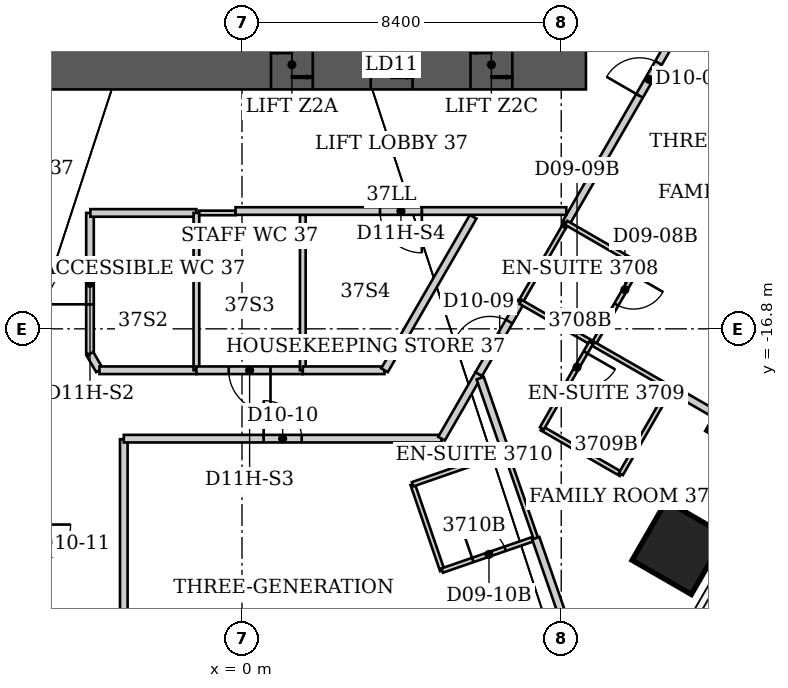
"""IFC4 building model, lengths in metres.
Left out: names, types, materials, properties, quantities, classifications, styles, units other than length and angle.
Written with IfcOpenShell. Run it as: python <this file> out.ifc"""

import sys

from ifc_helpers import new_model, si_unit, direction, frame, frame_2d, origin, origin_2d, place, context, subcontext, project, spatial, rectangle, extrude, element, fill, save


model = new_model("IFC4")
c1 = context("Model", 3, precision=1e-05, world=origin(), true_north=direction((0.0, 1.0)))
c2 = subcontext(c1, "Body", "Model", "MODEL_VIEW")
j1 = project(units=[si_unit("LENGTHUNIT", "METRE"), si_unit("PLANEANGLEUNIT", "RADIAN")], contexts=[c1])
p1 = place(None, origin())
s1 = spatial("IfcSite", under=j1, at=p1, CompositionType="ELEMENT")
p2 = place(p1, origin())
s2 = spatial("IfcBuilding", under=s1, at=p2, CompositionType="ELEMENT")
p3 = place(p2, frame((0.0, 0.0, 150.0)))
s3 = spatial("IfcBuildingStorey", under=s2, at=p3, CompositionType="ELEMENT", Elevation=150.0)
p4 = place(p3, frame((13.464, -19.147, -0.062), z_axis=(-0.029984502764, 0.04260955656, 0.998641755227), x_axis=(0.865747631398, -0.498245094486, 0.047253196188)))
e1 = element("IfcColumn", 1, at=p4, inside=s3, PredefinedType="COLUMN", context=c2, shape_type="SweptSolid", body=[
    extrude(rectangle(XDim=1.8, YDim=1.8, at=origin_2d()), origin(), (0.0, 0.0, 1.0), 3.868),
])
p5 = place(p3, frame((11.494, -22.559, -0.07), z_axis=(-0.025571235621, 0.050197721157, 0.998411889302), x_axis=(0.865745559121, -0.498251437924, 0.047224267791)))
e2 = element("IfcColumn", 2, at=p5, inside=s3, PredefinedType="COLUMN", context=c2, shape_type="SweptSolid", body=[
    extrude(rectangle(XDim=1.8, YDim=1.8, at=origin_2d()), origin(), (0.0, 0.0, 1.0), 3.876),
])
p6 = place(p3, frame((-9.05, -9.85, 0.0), z_axis=(0.0, 0.0, 1.0), x_axis=(1.0, 0.0, 0.0)))
e3 = element("IfcWall", 3, at=p6, inside=s3, PredefinedType="SHEAR", context=c2, shape_type="SweptSolid", body=[
    extrude(rectangle(XDim=18.1, YDim=1.3, at=frame_2d((9.05, 0.0))), origin(), (0.0, 0.0, 1.0), 3.8),
])
p7 = place(p6, frame((1.938, 0.0, 0.0)))
e4 = element("IfcOpeningElement", 4, at=p7, cuts=e3, PredefinedType="OPENING", context=c2, shape_type="SweptSolid", body=[
    extrude(rectangle(XDim=1.1, YDim=2.2, at=frame_2d((0.55, 1.1))), frame((0.0, 0.65, 0.0), z_axis=(0.0, -1.0, 0.0), x_axis=(1.0, 0.0, 0.0)), (0.0, 0.0, 1.0), 1.3),
])
p8 = place(p6, frame((9.812, 0.0, 0.0)))
e5 = element("IfcOpeningElement", 5, at=p8, cuts=e3, PredefinedType="OPENING", context=c2, shape_type="SweptSolid", body=[
    extrude(rectangle(XDim=1.1, YDim=2.1, at=frame_2d((0.55, 1.05))), frame((0.0, 0.65, 0.0), z_axis=(0.0, -1.0, 0.0), x_axis=(1.0, 0.0, 0.0)), (0.0, 0.0, 1.0), 1.3),
])
p9 = place(p6, frame((12.438, 0.0, 0.0)))
e6 = element("IfcOpeningElement", 6, at=p9, cuts=e3, PredefinedType="OPENING", context=c2, shape_type="SweptSolid", body=[
    extrude(rectangle(XDim=1.1, YDim=2.1, at=frame_2d((0.55, 1.05))), frame((0.0, 0.65, 0.0), z_axis=(0.0, -1.0, 0.0), x_axis=(1.0, 0.0, 0.0)), (0.0, 0.0, 1.0), 1.3),
])
p10 = place(p6, frame((15.062, 0.0, 0.0)))
e7 = element("IfcOpeningElement", 7, at=p10, cuts=e3, PredefinedType="OPENING", context=c2, shape_type="SweptSolid", body=[
    extrude(rectangle(XDim=1.1, YDim=2.1, at=frame_2d((0.55, 1.05))), frame((0.0, 0.65, 0.0), z_axis=(0.0, -1.0, 0.0), x_axis=(1.0, 0.0, 0.0)), (0.0, 0.0, 1.0), 1.3),
])
p11 = place(p3, frame((-4.0, -17.46, 0.0), z_axis=(0.0, 0.0, 1.0), x_axis=(0.0, 1.0, 0.0)))
e8 = element("IfcWall", 8, at=p11, inside=s3, PredefinedType="PARTITIONING", context=c2, shape_type="SweptSolid", body=[
    extrude(rectangle(XDim=3.71, YDim=0.2, at=frame_2d((1.855, 0.0))), origin(), (0.0, 0.0, 1.0), 2.878),
])
p12 = place(p11, frame((1.305, 0.0, 0.0)))
e9 = element("IfcOpeningElement", 9, at=p12, cuts=e8, PredefinedType="OPENING", context=c2, shape_type="SweptSolid", body=[
    extrude(rectangle(XDim=1.1, YDim=2.2, at=frame_2d((0.55, 1.1))), frame((0.0, 0.1, 0.0), z_axis=(0.0, -1.0, 0.0), x_axis=(1.0, 0.0, 0.0)), (0.0, 0.0, 1.0), 0.2),
])
p13 = place(p3, frame((-3.99, -13.75, 0.0), z_axis=(0.0, 0.0, 1.0), x_axis=(1.0, 0.0, 0.0)))
e10 = element("IfcWall", 10, at=p13, inside=s3, PredefinedType="PARTITIONING", context=c2, shape_type="SweptSolid", body=[
    extrude(rectangle(XDim=2.79, YDim=0.2, at=frame_2d((1.395, 0.0))), origin(), (0.0, 0.0, 1.0), 3.64),
])
p14 = place(p3, frame((-3.75, -17.89, 0.0), z_axis=(0.0, 0.0, 1.0), x_axis=(-0.502680181512, 0.864472460588, 0.0)))
e11 = element("IfcWall", 11, at=p14, inside=s3, PredefinedType="PARTITIONING", context=c2, shape_type="SweptSolid", body=[
    extrude(rectangle(XDim=0.497, YDim=0.2, at=frame_2d((0.249, 0.0))), origin(), (0.0, 0.0, 1.0), 3.64),
])
p15 = place(p3, frame((-3.11, -25.65, 0.0), z_axis=(0.0, 0.0, 1.0), x_axis=(0.0, 1.0, 0.0)))
e12 = element("IfcWall", 12, at=p15, inside=s3, PredefinedType="PARTITIONING", context=c2, shape_type="SweptSolid", body=[
    extrude(rectangle(XDim=5.945, YDim=0.2, at=frame_2d((2.972, 0.0))), origin(), (0.0, 0.0, 1.0), 3.64),
])
p16 = place(p3, frame((-3.11, -19.69, 0.0), z_axis=(0.0, 0.0, 1.0), x_axis=(1.0, 0.0, 0.0)))
e13 = element("IfcWall", 13, at=p16, inside=s3, PredefinedType="PARTITIONING", context=c2, shape_type="SweptSolid", body=[
    extrude(rectangle(XDim=8.36, YDim=0.2, at=frame_2d((4.18, 0.0))), origin(), (0.0, 0.0, 1.0), 3.64),
])
p17 = place(p16, frame((3.68, 0.0, 0.0)))
e14 = element("IfcOpeningElement", 14, at=p17, cuts=e13, PredefinedType="OPENING", context=c2, shape_type="SweptSolid", body=[
    extrude(rectangle(XDim=1.0, YDim=2.13, at=frame_2d((0.5, 1.065))), frame((0.0, 0.1, 0.0), z_axis=(0.0, -1.0, 0.0), x_axis=(1.0, 0.0, 0.0)), (0.0, 0.0, 1.0), 0.2),
])
p18 = place(p3, frame((-1.2, -17.89, 0.0), z_axis=(0.0, 0.0, 1.0), x_axis=(-1.0, 0.0, 0.0)))
e15 = element("IfcWall", 15, at=p18, inside=s3, PredefinedType="PARTITIONING", context=c2, shape_type="SweptSolid", body=[
    extrude(rectangle(XDim=2.55, YDim=0.2, at=frame_2d((1.275, 0.0))), origin(), (0.0, 0.0, 1.0), 3.64),
])
p19 = place(p3, frame((-1.2, -13.75, 0.0), z_axis=(0.0, 0.0, 1.0), x_axis=(0.0, -1.0, 0.0)))
e16 = element("IfcWall", 16, at=p19, inside=s3, PredefinedType="PARTITIONING", context=c2, shape_type="SweptSolid", body=[
    extrude(rectangle(XDim=4.14, YDim=0.15, at=frame_2d((2.07, 0.0))), origin(), (0.0, 0.0, 1.0), 3.64),
])
p20 = place(p3, frame((-1.125, -13.75, 0.0), z_axis=(0.0, 0.0, 1.0), x_axis=(1.0, 0.0, 0.0)))
e17 = element("IfcWall", 17, at=p20, inside=s3, PredefinedType="PARTITIONING", context=c2, shape_type="SweptSolid", body=[
    extrude(rectangle(XDim=0.955, YDim=0.12, at=frame_2d((0.478, 0.0))), origin(), (0.0, 0.0, 1.0), 3.64),
])
p21 = place(p3, frame((1.6, -17.89, 0.0), z_axis=(0.0, 0.0, 1.0), x_axis=(-1.0, 0.0, 0.0)))
e18 = element("IfcWall", 18, at=p21, inside=s3, PredefinedType="PARTITIONING", context=c2, shape_type="SweptSolid", body=[
    extrude(rectangle(XDim=2.8, YDim=0.2, at=frame_2d((1.4, 0.0))), origin(), (0.0, 0.0, 1.0), 3.64),
])
p22 = place(p21, frame((0.85, 0.0, 0.0)))
e19 = element("IfcOpeningElement", 19, at=p22, cuts=e18, PredefinedType="OPENING", context=c2, shape_type="SweptSolid", body=[
    extrude(rectangle(XDim=1.1, YDim=2.2, at=frame_2d((0.55, 1.1))), frame((0.0, 0.1, 0.0), z_axis=(0.0, -1.0, 0.0), x_axis=(1.0, 0.0, 0.0)), (0.0, 0.0, 1.0), 0.2),
])
p23 = place(p3, frame((1.6, -13.8, 0.0), z_axis=(0.0, 0.0, 1.0), x_axis=(0.0, -1.0, 0.0)))
e20 = element("IfcWall", 20, at=p23, inside=s3, PredefinedType="PARTITIONING", context=c2, shape_type="SweptSolid", body=[
    extrude(rectangle(XDim=4.09, YDim=0.15, at=frame_2d((2.045, 0.0))), origin(), (0.0, 0.0, 1.0), 3.64),
])
p24 = place(p3, frame((3.75, -17.89, 0.0), z_axis=(0.0, 0.0, 1.0), x_axis=(-1.0, 0.0, 0.0)))
e21 = element("IfcWall", 21, at=p24, inside=s3, PredefinedType="PARTITIONING", context=c2, shape_type="SweptSolid", body=[
    extrude(rectangle(XDim=2.15, YDim=0.2, at=frame_2d((1.075, 0.0))), origin(), (0.0, 0.0, 1.0), 3.64),
])
p25 = place(p3, frame((4.49, -20.89, 0.0), z_axis=(0.0, 0.0, 1.0), x_axis=(0.324971746724, -0.945723724896, 0.0)))
e22 = element("IfcWall", 22, at=p25, inside=s3, PredefinedType="PARTITIONING", context=c2, shape_type="SweptSolid", body=[
    extrude(rectangle(XDim=2.4, YDim=0.12, at=frame_2d((1.2, 0.0))), origin(), (0.0, 0.0, 1.0), 3.64),
])
p26 = place(p3, frame((5.25, -19.69, 0.0), z_axis=(0.0, 0.0, 1.0), x_axis=(0.499431599995, 0.866353321068, 0.0)))
e23 = element("IfcWall", 23, at=p26, inside=s3, PredefinedType="PARTITIONING", context=c2, shape_type="SweptSolid", body=[
    extrude(rectangle(XDim=1.962, YDim=0.2, at=frame_2d((0.981, 0.0))), origin(), (0.0, 0.0, 1.0), 3.64),
])
p27 = place(p3, frame((5.27, -23.16, 0.0), z_axis=(0.0, 0.0, 1.0), x_axis=(0.945184415197, 0.326537013627, 0.0)))
e24 = element("IfcWall", 24, at=p27, inside=s3, PredefinedType="PARTITIONING", context=c2, shape_type="SweptSolid", body=[
    extrude(rectangle(XDim=2.603, YDim=0.12, at=frame_2d((1.301, 0.0))), origin(), (0.0, 0.0, 1.0), 3.64),
])
p28 = place(p27, frame((0.85, 0.0, 0.0)))
e25 = element("IfcOpeningElement", 25, at=p28, cuts=e24, PredefinedType="OPENING", context=c2, shape_type="SweptSolid", body=[
    extrude(rectangle(XDim=0.9, YDim=2.03, at=frame_2d((0.45, 1.015))), frame((0.0, 0.06, 0.0), z_axis=(0.0, -1.0, 0.0), x_axis=(1.0, 0.0, 0.0)), (0.0, 0.0, 1.0), 0.12),
])
p29 = place(p3, frame((6.083, -13.85, 0.0), z_axis=(0.0, 0.0, 1.0), x_axis=(-0.499977643516, -0.866038310922, 0.0)))
e26 = element("IfcWall", 26, at=p29, inside=s3, PredefinedType="PARTITIONING", context=c2, shape_type="SweptSolid", body=[
    extrude(rectangle(XDim=4.665, YDim=0.2, at=frame_2d((2.333, 0.0))), origin(), (0.0, 0.0, 1.0), 3.64),
])
p30 = place(p3, frame((6.23, -17.99, 0.0), z_axis=(0.0, 0.0, 1.0), x_axis=(0.501088872721, 0.865395829453, 0.0)))
e27 = element("IfcWall", 27, at=p30, inside=s3, PredefinedType="PARTITIONING", context=c2, shape_type="SweptSolid", body=[
    extrude(rectangle(XDim=2.195, YDim=0.2, at=frame_2d((1.098, 0.0))), origin(), (0.0, 0.0, 1.0), 3.64),
])
p31 = place(p30, frame((0.598, 0.0, 0.0)))
e28 = element("IfcOpeningElement", 28, at=p31, cuts=e27, PredefinedType="OPENING", context=c2, shape_type="SweptSolid", body=[
    extrude(rectangle(XDim=1.0, YDim=2.13, at=frame_2d((0.5, 1.065))), frame((0.0, 0.1, 0.0), z_axis=(0.0, -1.0, 0.0), x_axis=(1.0, 0.0, 0.0)), (0.0, 0.0, 1.0), 0.2),
])
p32 = place(p3, frame((6.268, -18.099, 0.0), z_axis=(0.0, 0.0, 1.0), x_axis=(0.327257488288, -0.944935202202, 0.0)))
e29 = element("IfcWall", 29, at=p32, inside=s3, PredefinedType="PARTITIONING", context=c2, shape_type="SweptSolid", body=[
    extrude(rectangle(XDim=2.054, YDim=0.2, at=frame_2d((1.027, 0.0))), origin(), (0.0, 0.0, 1.0), 3.64),
])
p33 = place(p3, frame((6.94, -20.04, 0.0), z_axis=(0.0, 0.0, 1.0), x_axis=(-0.944772080486, -0.327728112822, 0.0)))
e30 = element("IfcWall", 30, at=p33, inside=s3, PredefinedType="PARTITIONING", context=c2, shape_type="SweptSolid", body=[
    extrude(rectangle(XDim=2.593, YDim=0.12, at=frame_2d((1.297, 0.0))), origin(), (0.0, 0.0, 1.0), 3.64),
])
p34 = place(p3, frame((6.94, -20.04, 0.0), z_axis=(0.0, 0.0, 1.0), x_axis=(0.328693963496, -0.944436487203, 0.0)))
e31 = element("IfcWall", 31, at=p34, inside=s3, PredefinedType="PARTITIONING", context=c2, shape_type="SweptSolid", body=[
    extrude(rectangle(XDim=2.404, YDim=0.12, at=frame_2d((1.202, 0.0))), origin(), (0.0, 0.0, 1.0), 3.64),
])
p35 = place(p3, frame((7.33, -16.09, 0.0), z_axis=(0.0, 0.0, 1.0), x_axis=(0.500786797394, 0.865570669302, 0.0)))
e32 = element("IfcWall", 32, at=p35, inside=s3, PredefinedType="PARTITIONING", context=c2, shape_type="SweptSolid", body=[
    extrude(rectangle(XDim=2.276, YDim=0.12, at=frame_2d((1.138, 0.0))), origin(), (0.0, 0.0, 1.0), 3.64),
])
p36 = place(p3, frame((7.33, -16.09, 0.0), z_axis=(0.0, 0.0, 1.0), x_axis=(0.866825160608, -0.498612214989, 0.0)))
e33 = element("IfcWall", 33, at=p36, inside=s3, PredefinedType="PARTITIONING", context=c2, shape_type="SweptSolid", body=[
    extrude(rectangle(XDim=2.146, YDim=0.12, at=frame_2d((1.073, 0.0))), origin(), (0.0, 0.0, 1.0), 3.64),
])
p37 = place(p3, frame((7.73, -22.31, 0.0), z_axis=(0.0, 0.0, 1.0), x_axis=(0.327284111977, -0.944925981253, 0.0)))
e34 = element("IfcWall", 34, at=p37, inside=s3, PredefinedType="PARTITIONING", context=c2, shape_type="SweptSolid", body=[
    extrude(rectangle(XDim=5.653, YDim=0.2, at=frame_2d((2.826, 0.0))), origin(), (0.0, 0.0, 1.0), 3.64),
])
p38 = place(p3, frame((7.89, -19.42, 0.0), z_axis=(0.0, 0.0, 1.0), x_axis=(0.866202511239, -0.499693115345, 0.0)))
e35 = element("IfcWall", 35, at=p38, inside=s3, PredefinedType="PARTITIONING", context=c2, shape_type="SweptSolid", body=[
    extrude(rectangle(XDim=2.401, YDim=0.12, at=frame_2d((1.201, 0.0))), origin(), (0.0, 0.0, 1.0), 3.64),
])
p39 = place(p3, frame((8.47, -14.12, 0.0), z_axis=(0.0, 0.0, 1.0), x_axis=(0.478852130681, 0.877895572914, 0.0)))
e36 = element("IfcWall", 36, at=p39, inside=s3, PredefinedType="PARTITIONING", context=c2, shape_type="SweptSolid", body=[
    extrude(rectangle(XDim=0.125, YDim=0.12, at=frame_2d((0.063, 0.0))), origin(), (0.0, 0.0, 1.0), 3.64),
])
p40 = place(p3, frame((8.53, -14.01, 0.0), z_axis=(0.0, 0.0, 1.0), x_axis=(0.500072306674, 0.865983653482, 0.0)))
e37 = element("IfcWall", 37, at=p40, inside=s3, PredefinedType="PARTITIONING", context=c2, shape_type="SweptSolid", body=[
    extrude(rectangle(XDim=8.719, YDim=0.2, at=frame_2d((4.359, 0.0))), origin(), (0.0, 0.0, 1.0), 3.64),
])
p41 = place(p40, frame((3.859, 0.0, 0.0)))
e38 = element("IfcOpeningElement", 38, at=p41, cuts=e37, PredefinedType="OPENING", context=c2, shape_type="SweptSolid", body=[
    extrude(rectangle(XDim=1.0, YDim=2.13, at=frame_2d((0.5, 1.065))), frame((0.0, 0.1, 0.0), z_axis=(0.0, -1.0, 0.0), x_axis=(1.0, 0.0, 0.0)), (0.0, 0.0, 1.0), 0.2),
])
p42 = place(p3, frame((8.534, -13.7, 0.0), z_axis=(0.0, 0.0, 1.0), x_axis=(-1.0, 0.0, 0.0)))
e39 = element("IfcWall", 39, at=p42, inside=s3, PredefinedType="PARTITIONING", context=c2, shape_type="SweptSolid", body=[
    extrude(rectangle(XDim=8.704, YDim=0.2, at=frame_2d((4.352, 0.0))), origin(), (0.0, 0.0, 1.0), 3.64),
])
p43 = place(p42, frame((3.802, 0.0, 0.0)))
e40 = element("IfcOpeningElement", 40, at=p43, cuts=e39, PredefinedType="OPENING", context=c2, shape_type="SweptSolid", body=[
    extrude(rectangle(XDim=1.1, YDim=2.2, at=frame_2d((0.55, 1.1))), frame((0.0, 0.1, 0.0), z_axis=(0.0, -1.0, 0.0), x_axis=(1.0, 0.0, 0.0)), (0.0, 0.0, 1.0), 0.2),
])
p44 = place(p3, frame((9.19, -17.16, 0.0), z_axis=(0.0, 0.0, 1.0), x_axis=(-0.498627694264, -0.866816256489, 0.0)))
e41 = element("IfcWall", 41, at=p44, inside=s3, PredefinedType="PARTITIONING", context=c2, shape_type="SweptSolid", body=[
    extrude(rectangle(XDim=2.607, YDim=0.12, at=frame_2d((1.304, 0.0))), origin(), (0.0, 0.0, 1.0), 3.64),
])
p45 = place(p44, frame((0.3, 0.0, 0.0)))
e42 = element("IfcOpeningElement", 42, at=p45, cuts=e41, PredefinedType="OPENING", context=c2, shape_type="SweptSolid", body=[
    extrude(rectangle(XDim=0.9, YDim=2.03, at=frame_2d((0.45, 1.015))), frame((0.0, 0.06, 0.0), z_axis=(0.0, -1.0, 0.0), x_axis=(1.0, 0.0, 0.0)), (0.0, 0.0, 1.0), 0.12),
])
p46 = place(p3, frame((9.25, -17.2, 0.0), z_axis=(0.0, 0.0, 1.0), x_axis=(0.499737123639, 0.866177122335, 0.0)))
e43 = element("IfcWall", 43, at=p46, inside=s3, PredefinedType="PARTITIONING", context=c2, shape_type="SweptSolid", body=[
    extrude(rectangle(XDim=2.401, YDim=0.12, at=frame_2d((1.201, 0.0))), origin(), (0.0, 0.0, 1.0), 3.64),
])
p47 = place(p46, frame((1.201, 0.0, 0.0)))
e44 = element("IfcOpeningElement", 44, at=p47, cuts=e43, PredefinedType="OPENING", context=c2, shape_type="SweptSolid", body=[
    extrude(rectangle(XDim=0.9, YDim=2.03, at=frame_2d((0.45, 1.015))), frame((0.0, 0.06, 0.0), z_axis=(0.0, -1.0, 0.0), x_axis=(1.0, 0.0, 0.0)), (0.0, 0.0, 1.0), 0.12),
])
p48 = place(p3, frame((9.25, -17.2, 0.0), z_axis=(0.0, 0.0, 1.0), x_axis=(0.867157547908, -0.498033921641, 0.0)))
e45 = element("IfcWall", 45, at=p48, inside=s3, PredefinedType="PARTITIONING", context=c2, shape_type="SweptSolid", body=[
    extrude(rectangle(XDim=2.33, YDim=0.12, at=frame_2d((1.165, 0.0))), origin(), (0.0, 0.0, 1.0), 3.64),
])
p49 = place(p3, frame((9.97, -20.62, 0.0), z_axis=(0.0, 0.0, 1.0), x_axis=(0.498627694264, 0.866816256489, 0.0)))
e46 = element("IfcWall", 46, at=p49, inside=s3, PredefinedType="PARTITIONING", context=c2, shape_type="SweptSolid", body=[
    extrude(rectangle(XDim=2.607, YDim=0.12, at=frame_2d((1.304, 0.0))), origin(), (0.0, 0.0, 1.0), 3.64),
])
p50 = place(p3, frame((10.45, -15.12, 0.0), z_axis=(0.0, 0.0, 1.0), x_axis=(-0.865705017107, 0.500554515868, 0.0)))
e47 = element("IfcWall", 47, at=p50, inside=s3, PredefinedType="PARTITIONING", context=c2, shape_type="SweptSolid", body=[
    extrude(rectangle(XDim=2.218, YDim=0.12, at=frame_2d((1.109, 0.0))), origin(), (0.0, 0.0, 1.0), 3.023),
])
p51 = place(p3, frame((11.27, -18.36, 0.0), z_axis=(0.0, 0.0, 1.0), x_axis=(0.865806952829, -0.500378177414, 0.0)))
e48 = element("IfcWall", 48, at=p51, inside=s3, PredefinedType="PARTITIONING", context=c2, shape_type="SweptSolid", body=[
    extrude(rectangle(XDim=3.437, YDim=0.2, at=frame_2d((1.719, 0.0))), origin(), (0.0, 0.0, 1.0), 3.64),
])
p52 = place(p41, origin())
e49 = element("IfcDoor", 49, at=p52, inside=s3, OperationType="SINGLE_SWING_LEFT", PredefinedType="DOOR", context=c2, shape_type="SweptSolid", body=[
    extrude(rectangle(XDim=1.0, YDim=2.13, at=frame_2d((0.5, 1.065))), frame((0.0, 0.025, 0.0), z_axis=(0.0, -1.0, 0.0), x_axis=(1.0, 0.0, 0.0)), (0.0, 0.0, 1.0), 0.05),
])
fill(e38, e49)
p53 = place(p47, origin())
e50 = element("IfcDoor", 50, at=p53, inside=s3, OperationType="SINGLE_SWING_RIGHT", PredefinedType="DOOR", context=c2, shape_type="SweptSolid", body=[
    extrude(rectangle(XDim=0.9, YDim=2.03, at=frame_2d((0.45, 1.015))), frame((0.0, 0.025, 0.0), z_axis=(0.0, -1.0, 0.0), x_axis=(1.0, 0.0, 0.0)), (0.0, 0.0, 1.0), 0.05),
])
fill(e44, e50)
p54 = place(p31, origin())
e51 = element("IfcDoor", 51, at=p54, inside=s3, OperationType="SINGLE_SWING_LEFT", PredefinedType="DOOR", context=c2, shape_type="SweptSolid", body=[
    extrude(rectangle(XDim=1.0, YDim=2.13, at=frame_2d((0.5, 1.065))), frame((0.0, 0.025, 0.0), z_axis=(0.0, -1.0, 0.0), x_axis=(1.0, 0.0, 0.0)), (0.0, 0.0, 1.0), 0.05),
])
fill(e28, e51)
p55 = place(p45, origin())
e52 = element("IfcDoor", 52, at=p55, inside=s3, OperationType="SINGLE_SWING_LEFT", PredefinedType="DOOR", context=c2, shape_type="SweptSolid", body=[
    extrude(rectangle(XDim=0.9, YDim=2.03, at=frame_2d((0.45, 1.015))), frame((0.0, 0.025, 0.0), z_axis=(0.0, -1.0, 0.0), x_axis=(1.0, 0.0, 0.0)), (0.0, 0.0, 1.0), 0.05),
])
fill(e42, e52)
p56 = place(p17, origin())
e53 = element("IfcDoor", 53, at=p56, inside=s3, OperationType="SINGLE_SWING_LEFT", PredefinedType="DOOR", context=c2, shape_type="SweptSolid", body=[
    extrude(rectangle(XDim=1.0, YDim=2.13, at=frame_2d((0.5, 1.065))), frame((0.0, 0.025, 0.0), z_axis=(0.0, -1.0, 0.0), x_axis=(1.0, 0.0, 0.0)), (0.0, 0.0, 1.0), 0.05),
])
fill(e14, e53)
p57 = place(p28, origin())
e54 = element("IfcDoor", 54, at=p57, inside=s3, OperationType="SINGLE_SWING_LEFT", PredefinedType="DOOR", context=c2, shape_type="SweptSolid", body=[
    extrude(rectangle(XDim=0.9, YDim=2.03, at=frame_2d((0.45, 1.015))), frame((0.0, 0.025, 0.0), z_axis=(0.0, -1.0, 0.0), x_axis=(1.0, 0.0, 0.0)), (0.0, 0.0, 1.0), 0.05),
])
fill(e25, e54)
p58 = place(p12, origin())
e55 = element("IfcDoor", 55, at=p58, inside=s3, OperationType="SINGLE_SWING_LEFT", PredefinedType="DOOR", context=c2, shape_type="SweptSolid", body=[
    extrude(rectangle(XDim=1.1, YDim=2.2, at=frame_2d((0.55, 1.1))), frame((0.0, 0.025, 0.0), z_axis=(0.0, -1.0, 0.0), x_axis=(1.0, 0.0, 0.0)), (0.0, 0.0, 1.0), 0.05),
])
fill(e9, e55)
p59 = place(p22, origin())
e56 = element("IfcDoor", 56, at=p59, inside=s3, OperationType="SINGLE_SWING_LEFT", PredefinedType="DOOR", context=c2, shape_type="SweptSolid", body=[
    extrude(rectangle(XDim=1.1, YDim=2.2, at=frame_2d((0.55, 1.1))), frame((0.0, 0.025, 0.0), z_axis=(0.0, -1.0, 0.0), x_axis=(1.0, 0.0, 0.0)), (0.0, 0.0, 1.0), 0.05),
])
fill(e19, e56)
p60 = place(p43, origin())
e57 = element("IfcDoor", 57, at=p60, inside=s3, OperationType="SINGLE_SWING_LEFT", PredefinedType="DOOR", context=c2, shape_type="SweptSolid", body=[
    extrude(rectangle(XDim=1.1, YDim=2.2, at=frame_2d((0.55, 1.1))), frame((0.0, 0.025, 0.0), z_axis=(0.0, -1.0, 0.0), x_axis=(1.0, 0.0, 0.0)), (0.0, 0.0, 1.0), 0.05),
])
fill(e40, e57)
p61 = place(p8, origin())
e58 = element("IfcDoor", 58, at=p61, inside=s3, OperationType="DOUBLE_DOOR_SLIDING", PredefinedType="DOOR", context=c2, shape_type="SweptSolid", body=[
    extrude(rectangle(XDim=1.1, YDim=2.1, at=frame_2d((0.55, 1.05))), frame((0.0, 0.025, 0.0), z_axis=(0.0, -1.0, 0.0), x_axis=(1.0, 0.0, 0.0)), (0.0, 0.0, 1.0), 0.05),
])
fill(e5, e58)
p62 = place(p9, origin())
e59 = element("IfcDoor", 59, at=p62, inside=s3, OperationType="DOUBLE_DOOR_SLIDING", PredefinedType="DOOR", context=c2, shape_type="SweptSolid", body=[
    extrude(rectangle(XDim=1.1, YDim=2.1, at=frame_2d((0.55, 1.05))), frame((0.0, 0.025, 0.0), z_axis=(0.0, -1.0, 0.0), x_axis=(1.0, 0.0, 0.0)), (0.0, 0.0, 1.0), 0.05),
])
fill(e6, e59)
p63 = place(p10, origin())
e60 = element("IfcDoor", 60, at=p63, inside=s3, OperationType="DOUBLE_DOOR_SLIDING", PredefinedType="DOOR", context=c2, shape_type="SweptSolid", body=[
    extrude(rectangle(XDim=1.1, YDim=2.1, at=frame_2d((0.55, 1.05))), frame((0.0, 0.025, 0.0), z_axis=(0.0, -1.0, 0.0), x_axis=(1.0, 0.0, 0.0)), (0.0, 0.0, 1.0), 0.05),
])
fill(e7, e60)
save(model, sys.argv[1])
